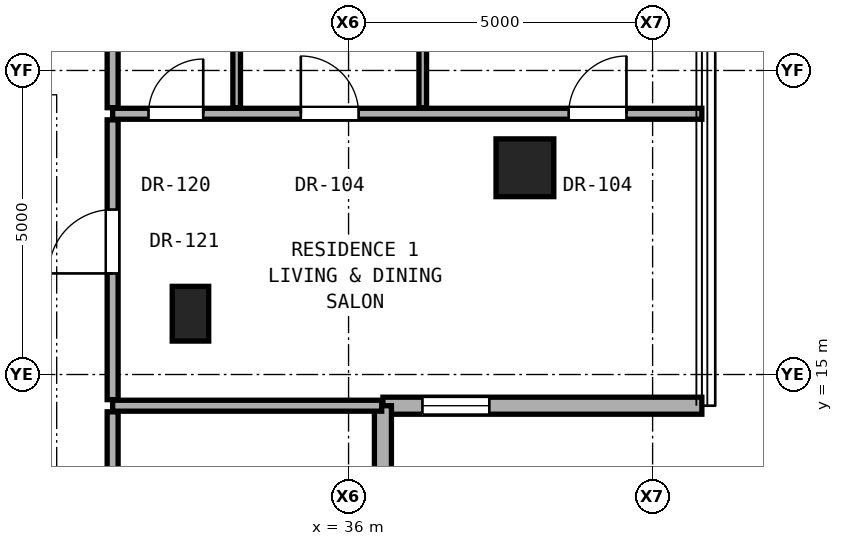
"""IFC4 building model, lengths in metres.
Left out: names, types, materials, properties, quantities, classifications, styles, units other than length and angle.
Written with IfcOpenShell. Run it as: python <this file> out.ifc"""

import sys

from ifc_helpers import new_model, si_unit, direction, frame, frame_2d, origin, origin_2d, place, context, subcontext, project, spatial, rectangle, hollow_rectangle, extrude, element, fill, save


model = new_model("IFC4")
c1 = context("Model", 3, precision=1e-05, world=origin(), true_north=direction((0.0, 1.0)))
c2 = subcontext(c1, "Body", "Model", "MODEL_VIEW")
j1 = project(units=[si_unit("LENGTHUNIT", "METRE"), si_unit("PLANEANGLEUNIT", "RADIAN")], contexts=[c1])
p1 = place(None, origin())
s1 = spatial("IfcSite", under=j1, at=p1, CompositionType="ELEMENT")
p2 = place(p1, origin())
s2 = spatial("IfcBuilding", under=s1, at=p2, CompositionType="ELEMENT")
p3 = place(p2, frame((0.0, 0.0, 173.9)))
s3 = spatial("IfcBuildingStorey", under=s2, at=p3, CompositionType="ELEMENT", Elevation=173.9)
p4 = place(p3, frame((38.9, 18.4, 0.0), z_axis=(0.0, 0.0, 1.0), x_axis=(1.0, 0.0, 0.0)))
e1 = element("IfcColumn", 1, at=p4, inside=s3, PredefinedType="COLUMN", context=c2, shape_type="SweptSolid", body=[
    extrude(hollow_rectangle(XDim=0.95, YDim=0.95, WallThickness=0.05, at=origin_2d()), origin(), (0.0, 0.0, 1.0), 3.25),
])
p5 = place(p3, frame((33.4, 16.0, 0.0), z_axis=(0.0, 0.0, 1.0), x_axis=(1.0, 0.0, 0.0)))
e2 = element("IfcColumn", 2, at=p5, inside=s3, PredefinedType="PILASTER", context=c2, shape_type="SweptSolid", body=[
    extrude(rectangle(XDim=0.6, YDim=0.9, at=origin_2d()), origin(), (0.0, 0.0, 1.0), 3.25),
])
p6 = place(p3, frame((36.565, 14.487, 0.0), z_axis=(0.0, 0.0, 1.0), x_axis=(1.0, 0.0, 0.0)))
e3 = element("IfcWall", 3, at=p6, inside=s3, PredefinedType="SOLIDWALL", context=c2, shape_type="SweptSolid", body=[
    extrude(rectangle(XDim=5.245, YDim=0.28, at=frame_2d((2.623, 0.0))), origin(), (0.0, 0.0, 1.0), 3.03),
])
p7 = place(p6, frame((0.65, 0.0, 0.85)))
e4 = element("IfcOpeningElement", 4, at=p7, cuts=e3, PredefinedType="OPENING", context=c2, shape_type="SweptSolid", body=[
    extrude(rectangle(XDim=1.1, YDim=2.0, at=frame_2d((0.55, 1.0))), frame((0.0, 0.15, 0.0), z_axis=(0.0, -1.0, 0.0), x_axis=(1.0, 0.0, 0.0)), (0.0, 0.0, 1.0), 0.3),
])
p8 = place(p3, frame((36.565, 9.242, 0.0), z_axis=(0.0, 0.0, 1.0), x_axis=(0.0, 1.0, 0.0)))
e5 = element("IfcWall", 5, at=p8, inside=s3, PredefinedType="SOLIDWALL", context=c2, shape_type="SweptSolid", body=[
    extrude(rectangle(XDim=5.245, YDim=0.28, at=frame_2d((2.623, 0.0))), origin(), (0.0, 0.0, 1.0), 3.03),
])
p9 = place(p3, frame((32.12, 14.487, 0.0), z_axis=(0.0, 0.0, 1.0), x_axis=(1.0, 0.0, 0.0)))
e6 = element("IfcWall", 6, at=p9, inside=s3, PredefinedType="PARTITIONING", context=c2, shape_type="SweptSolid", body=[
    extrude(rectangle(XDim=4.425, YDim=0.18, at=frame_2d((2.212, 0.0))), origin(), (0.0, 0.0, 1.0), 3.05),
])
p10 = place(p3, frame((32.12, 19.288, 0.0), z_axis=(0.0, 0.0, 1.0), x_axis=(1.0, 0.0, 0.0)))
e7 = element("IfcWall", 7, at=p10, inside=s3, PredefinedType="PARTITIONING", context=c2, shape_type="SweptSolid", body=[
    extrude(rectangle(XDim=9.69, YDim=0.18, at=frame_2d((4.845, 0.0))), origin(), (0.0, 0.0, 1.0), 2.269),
])
p11 = place(p10, frame((7.5, 0.0, 0.0)))
e8 = element("IfcOpeningElement", 8, at=p11, cuts=e7, PredefinedType="OPENING", context=c2, shape_type="SweptSolid", body=[
    extrude(rectangle(XDim=0.95, YDim=2.15, at=frame_2d((0.475, 1.075))), frame((0.0, 0.1, 0.0), z_axis=(0.0, -1.0, 0.0), x_axis=(1.0, 0.0, 0.0)), (0.0, 0.0, 1.0), 0.2),
])
p12 = place(p10, frame((3.095, 0.0, 0.0)))
e9 = element("IfcOpeningElement", 9, at=p12, cuts=e7, PredefinedType="OPENING", context=c2, shape_type="SweptSolid", body=[
    extrude(rectangle(XDim=0.95, YDim=2.15, at=frame_2d((0.475, 1.075))), frame((0.0, 0.1, 0.0), z_axis=(0.0, -1.0, 0.0), x_axis=(1.0, 0.0, 0.0)), (0.0, 0.0, 1.0), 0.2),
])
p13 = place(p10, frame((0.59, 0.0, 0.0)))
e10 = element("IfcOpeningElement", 10, at=p13, cuts=e7, PredefinedType="OPENING", context=c2, shape_type="SweptSolid", body=[
    extrude(rectangle(XDim=0.9, YDim=2.1, at=frame_2d((0.45, 1.05))), frame((0.0, 0.1, 0.0), z_axis=(0.0, -1.0, 0.0), x_axis=(1.0, 0.0, 0.0)), (0.0, 0.0, 1.0), 0.2),
])
p14 = place(p3, frame((32.12, 9.242, 0.0), z_axis=(0.0, 0.0, 1.0), x_axis=(0.0, 1.0, 0.0)))
e11 = element("IfcWall", 11, at=p14, inside=s3, PredefinedType="PARTITIONING", context=c2, shape_type="SweptSolid", body=[
    extrude(rectangle(XDim=5.145, YDim=0.18, at=frame_2d((2.573, 0.0))), origin(), (0.0, 0.0, 1.0), 3.05),
])
p15 = place(p14, frame((2.097, 0.0, 0.0)))
e12 = element("IfcOpeningElement", 12, at=p15, cuts=e11, PredefinedType="OPENING", context=c2, shape_type="SweptSolid", body=[
    extrude(rectangle(XDim=0.95, YDim=2.15, at=frame_2d((0.475, 1.075))), frame((0.0, 0.1, 0.0), z_axis=(0.0, -1.0, 0.0), x_axis=(1.0, 0.0, 0.0)), (0.0, 0.0, 1.0), 0.2),
])
p16 = place(p3, frame((32.12, 14.587, 0.0), z_axis=(0.0, 0.0, 1.0), x_axis=(0.0, 1.0, 0.0)))
e13 = element("IfcWall", 13, at=p16, inside=s3, PredefinedType="PARTITIONING", context=c2, shape_type="SweptSolid", body=[
    extrude(rectangle(XDim=4.601, YDim=0.18, at=frame_2d((2.301, 0.0))), origin(), (0.0, 0.0, 1.0), 2.442),
])
p17 = place(p16, frame((2.075, 0.0, 0.0)))
e14 = element("IfcOpeningElement", 14, at=p17, cuts=e13, PredefinedType="OPENING", context=c2, shape_type="SweptSolid", body=[
    extrude(rectangle(XDim=1.05, YDim=2.2, at=frame_2d((0.525, 1.1))), frame((0.0, 0.1, 0.0), z_axis=(0.0, -1.0, 0.0), x_axis=(1.0, 0.0, 0.0)), (0.0, 0.0, 1.0), 0.2),
])
p18 = place(p3, frame((32.12, 19.388, 0.0), z_axis=(0.0, 0.0, 1.0), x_axis=(0.0, 1.0, 0.0)))
e15 = element("IfcWall", 15, at=p18, inside=s3, PredefinedType="PARTITIONING", context=c2, shape_type="SweptSolid", body=[
    extrude(rectangle(XDim=2.52, YDim=0.18, at=frame_2d((1.26, 0.0))), origin(), (0.0, 0.0, 1.0), 3.05),
])
for number, where, z_axis, x_axis in (
    (16, (34.16, 19.388, 0.0), (0.0, 0.0, 1.0), (0.0, 1.0, 0.0)),
    (17, (37.22, 19.388, 0.0), (0.0, 0.0, 1.0), (0.0, 1.0, 0.0)),
):
    element("IfcWall", number, at=place(p3, frame(where, z_axis=z_axis, x_axis=x_axis)), inside=s3, PredefinedType="PARTITIONING", context=c2, shape_type="SweptSolid", body=[
        extrude(rectangle(XDim=2.52, YDim=0.125, at=frame_2d((1.26, 0.0))), origin(), (0.0, 0.0, 1.0), 3.05),
    ])
p19 = place(p7, origin())
e18 = element("IfcWindow", 18, at=p19, inside=s3, PartitioningType="SINGLE_PANEL", PredefinedType="WINDOW", context=c2, shape_type="SweptSolid", body=[
    extrude(rectangle(XDim=1.1, YDim=2.0, at=frame_2d((0.55, 1.0))), frame((0.0, 0.03, 0.0), z_axis=(0.0, -1.0, 0.0), x_axis=(1.0, 0.0, 0.0)), (0.0, 0.0, 1.0), 0.06),
])
fill(e4, e18)
p20 = place(p17, origin())
e19 = element("IfcDoor", 19, at=p20, inside=s3, OperationType="SINGLE_SWING_LEFT", PredefinedType="DOOR", context=c2, shape_type="SweptSolid", body=[
    extrude(rectangle(XDim=1.05, YDim=2.2, at=frame_2d((0.525, 1.1))), frame((0.0, 0.025, 0.0), z_axis=(0.0, -1.0, 0.0), x_axis=(1.0, 0.0, 0.0)), (0.0, 0.0, 1.0), 0.05),
])
fill(e14, e19)
p21 = place(p11, origin())
e20 = element("IfcDoor", 20, at=p21, inside=s3, OperationType="SINGLE_SWING_RIGHT", PredefinedType="DOOR", context=c2, shape_type="SweptSolid", body=[
    extrude(rectangle(XDim=0.95, YDim=2.15, at=frame_2d((0.475, 1.075))), frame((0.0, 0.025, 0.0), z_axis=(0.0, -1.0, 0.0), x_axis=(1.0, 0.0, 0.0)), (0.0, 0.0, 1.0), 0.05),
])
fill(e8, e20)
p22 = place(p12, origin())
e21 = element("IfcDoor", 21, at=p22, inside=s3, OperationType="SINGLE_SWING_LEFT", PredefinedType="DOOR", context=c2, shape_type="SweptSolid", body=[
    extrude(rectangle(XDim=0.95, YDim=2.15, at=frame_2d((0.475, 1.075))), frame((0.0, 0.025, 0.0), z_axis=(0.0, -1.0, 0.0), x_axis=(1.0, 0.0, 0.0)), (0.0, 0.0, 1.0), 0.05),
])
fill(e9, e21)
p23 = place(p13, origin())
e22 = element("IfcDoor", 22, at=p23, inside=s3, OperationType="SINGLE_SWING_RIGHT", PredefinedType="DOOR", context=c2, shape_type="SweptSolid", body=[
    extrude(rectangle(XDim=0.9, YDim=2.1, at=frame_2d((0.45, 1.05))), frame((0.0, 0.025, 0.0), z_axis=(0.0, -1.0, 0.0), x_axis=(1.0, 0.0, 0.0)), (0.0, 0.0, 1.0), 0.05),
])
fill(e10, e22)
save(model, sys.argv[1])
